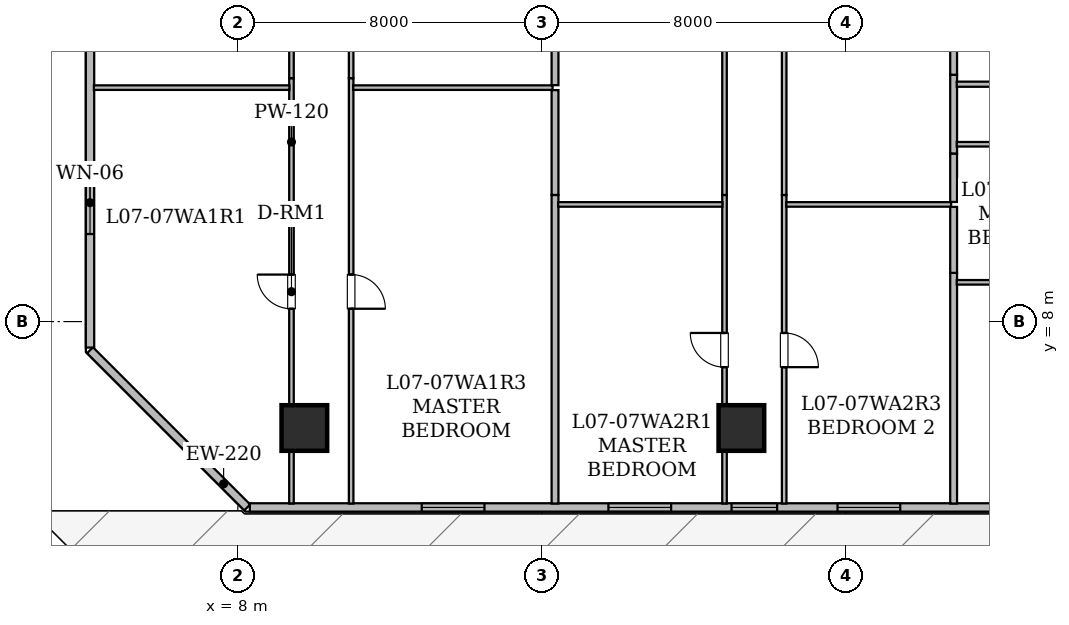
"""IFC4 building model, lengths in metres.
Left out: names, types, materials, properties, quantities, classifications, styles, units other than length and angle.
Written with IfcOpenShell. Run it as: python <this file> out.ifc"""

import sys

from ifc_helpers import new_model, si_unit, direction, frame, frame_2d, origin, origin_2d, place, context, subcontext, project, spatial, rectangle, hollow_rectangle, extrude, element, fill, save


model = new_model("IFC4")
c1 = context("Model", 3, precision=1e-05, world=origin(), true_north=direction((0.0, 1.0)))
c2 = subcontext(c1, "Body", "Model", "MODEL_VIEW")
j1 = project(units=[si_unit("LENGTHUNIT", "METRE"), si_unit("PLANEANGLEUNIT", "RADIAN")], contexts=[c1])
p1 = place(None, origin())
s1 = spatial("IfcSite", under=j1, at=p1, CompositionType="ELEMENT")
p2 = place(p1, origin())
s2 = spatial("IfcBuilding", under=s1, at=p2, CompositionType="ELEMENT")
p3 = place(p2, frame((0.0, 0.0, 33.3)))
s3 = spatial("IfcBuildingStorey", under=s2, at=p3, CompositionType="ELEMENT", Elevation=33.3)
for number, where, z_axis, x_axis in (
    (1, (9.75, 5.2, 0.025), (0.0, 0.0, 1.0), (1.0, 0.0, 0.0)),
    (2, (21.25, 5.2, 0.025), (0.0, 0.0, 1.0), (1.0, 0.0, 0.0)),
):
    element("IfcColumn", number, at=place(p3, frame(where, z_axis=z_axis, x_axis=x_axis)), inside=s3, PredefinedType="COLUMN", context=c2, shape_type="SweptSolid", body=[
        extrude(hollow_rectangle(XDim=1.2, YDim=1.2, WallThickness=0.06, at=origin_2d()), origin(), (0.0, 0.0, 1.0), 3.625),
    ])
p4 = place(p3, frame((8.246, 3.11, 0.0), z_axis=(0.0, 0.0, 1.0), x_axis=(-0.707106781187, 0.707106781187, 0.0)))
e3 = element("IfcWall", 3, at=p4, inside=s3, PredefinedType="STANDARD", context=c2, shape_type="SweptSolid", body=[
    extrude(rectangle(XDim=5.849, YDim=0.22, at=frame_2d((2.925, 0.0))), origin(), (0.0, 0.0, 1.0), 3.43),
])
p5 = place(p3, frame((4.11, 7.317, 0.0), z_axis=(0.0, 0.0, 1.0), x_axis=(0.0, 1.0, 0.0)))
e4 = element("IfcWall", 4, at=p5, inside=s3, PredefinedType="STANDARD", context=c2, shape_type="SweptSolid", body=[
    extrude(rectangle(XDim=17.446, YDim=0.22, at=frame_2d((8.723, 0.0))), origin(), (0.0, 0.0, 1.0), 3.43),
])
p6 = place(p5, frame((13.748, 0.0, 0.8)))
e5 = element("IfcOpeningElement", 5, at=p6, cuts=e4, PredefinedType="OPENING", context=c2, shape_type="SweptSolid", body=[
    extrude(rectangle(XDim=1.2, YDim=1.5, at=frame_2d((0.6, 0.75))), frame((0.0, 0.12, 0.0), z_axis=(0.0, -1.0, 0.0), x_axis=(1.0, 0.0, 0.0)), (0.0, 0.0, 1.0), 0.24),
])
p7 = place(p5, frame((2.987, 0.0, 0.85)))
e6 = element("IfcOpeningElement", 6, at=p7, cuts=e4, PredefinedType="OPENING", context=c2, shape_type="SweptSolid", body=[
    extrude(rectangle(XDim=1.65, YDim=1.55, at=frame_2d((0.825, 0.775))), frame((0.0, 0.12, 0.0), z_axis=(0.0, -1.0, 0.0), x_axis=(1.0, 0.0, 0.0)), (0.0, 0.0, 1.0), 0.24),
])
p8 = place(p5, frame((9.373, 0.0, 0.85)))
e7 = element("IfcOpeningElement", 7, at=p8, cuts=e4, PredefinedType="OPENING", context=c2, shape_type="SweptSolid", body=[
    extrude(rectangle(XDim=1.65, YDim=1.55, at=frame_2d((0.825, 0.775))), frame((0.0, 0.12, 0.0), z_axis=(0.0, -1.0, 0.0), x_axis=(1.0, 0.0, 0.0)), (0.0, 0.0, 1.0), 0.24),
])
p9 = place(p3, frame((45.683, 3.11, 0.0), z_axis=(0.0, 0.0, 1.0), x_axis=(-1.0, 0.0, 0.0)))
e8 = element("IfcWall", 8, at=p9, inside=s3, PredefinedType="STANDARD", context=c2, shape_type="SweptSolid", body=[
    extrude(rectangle(XDim=37.368, YDim=0.22, at=frame_2d((18.684, 0.0))), origin(), (0.0, 0.0, 1.0), 3.43),
])
p10 = place(p9, frame((5.728, 0.0, 0.0)))
e9 = element("IfcOpeningElement", 9, at=p10, cuts=e8, PredefinedType="OPENING", context=c2, shape_type="SweptSolid", body=[
    extrude(rectangle(XDim=1.0, YDim=2.15, at=frame_2d((0.5, 1.075))), frame((0.0, 0.12, 0.0), z_axis=(0.0, -1.0, 0.0), x_axis=(1.0, 0.0, 0.0)), (0.0, 0.0, 1.0), 0.24),
])
p11 = place(p9, frame((31.194, 0.0, 0.85)))
e10 = element("IfcOpeningElement", 10, at=p11, cuts=e8, PredefinedType="OPENING", context=c2, shape_type="SweptSolid", body=[
    extrude(rectangle(XDim=1.65, YDim=1.55, at=frame_2d((0.825, 0.775))), frame((0.0, 0.12, 0.0), z_axis=(0.0, -1.0, 0.0), x_axis=(1.0, 0.0, 0.0)), (0.0, 0.0, 1.0), 0.24),
])
p12 = place(p9, frame((23.492, 0.0, 0.8)))
e11 = element("IfcOpeningElement", 11, at=p12, cuts=e8, PredefinedType="OPENING", context=c2, shape_type="SweptSolid", body=[
    extrude(rectangle(XDim=1.2, YDim=1.5, at=frame_2d((0.6, 0.75))), frame((0.0, 0.12, 0.0), z_axis=(0.0, -1.0, 0.0), x_axis=(1.0, 0.0, 0.0)), (0.0, 0.0, 1.0), 0.24),
])
p13 = place(p9, frame((26.282, 0.0, 0.85)))
e12 = element("IfcOpeningElement", 12, at=p13, cuts=e8, PredefinedType="OPENING", context=c2, shape_type="SweptSolid", body=[
    extrude(rectangle(XDim=1.65, YDim=1.55, at=frame_2d((0.825, 0.775))), frame((0.0, 0.12, 0.0), z_axis=(0.0, -1.0, 0.0), x_axis=(1.0, 0.0, 0.0)), (0.0, 0.0, 1.0), 0.24),
])
p14 = place(p9, frame((20.253, 0.0, 0.85)))
e13 = element("IfcOpeningElement", 13, at=p14, cuts=e8, PredefinedType="OPENING", context=c2, shape_type="SweptSolid", body=[
    extrude(rectangle(XDim=1.65, YDim=1.55, at=frame_2d((0.825, 0.775))), frame((0.0, 0.12, 0.0), z_axis=(0.0, -1.0, 0.0), x_axis=(1.0, 0.0, 0.0)), (0.0, 0.0, 1.0), 0.24),
])
p15 = place(p9, frame((10.983, 0.0, 0.8)))
e14 = element("IfcOpeningElement", 14, at=p15, cuts=e8, PredefinedType="OPENING", context=c2, shape_type="SweptSolid", body=[
    extrude(rectangle(XDim=1.2, YDim=1.5, at=frame_2d((0.6, 0.75))), frame((0.0, 0.12, 0.0), z_axis=(0.0, -1.0, 0.0), x_axis=(1.0, 0.0, 0.0)), (0.0, 0.0, 1.0), 0.24),
])
p16 = place(p9, frame((14.783, 0.0, 0.85)))
e15 = element("IfcOpeningElement", 15, at=p16, cuts=e8, PredefinedType="OPENING", context=c2, shape_type="SweptSolid", body=[
    extrude(rectangle(XDim=1.65, YDim=1.55, at=frame_2d((0.825, 0.775))), frame((0.0, 0.12, 0.0), z_axis=(0.0, -1.0, 0.0), x_axis=(1.0, 0.0, 0.0)), (0.0, 0.0, 1.0), 0.24),
])
p17 = place(p9, frame((2.228, 0.0, 0.85)))
e16 = element("IfcOpeningElement", 16, at=p17, cuts=e8, PredefinedType="OPENING", context=c2, shape_type="SweptSolid", body=[
    extrude(rectangle(XDim=1.65, YDim=1.55, at=frame_2d((0.825, 0.775))), frame((0.0, 0.12, 0.0), z_axis=(0.0, -1.0, 0.0), x_axis=(1.0, 0.0, 0.0)), (0.0, 0.0, 1.0), 0.24),
])
p18 = place(p9, frame((0.187, 0.0, 0.8)))
e17 = element("IfcOpeningElement", 17, at=p18, cuts=e8, PredefinedType="OPENING", context=c2, shape_type="SweptSolid", body=[
    extrude(rectangle(XDim=1.2, YDim=1.5, at=frame_2d((0.6, 0.75))), frame((0.0, 0.12, 0.0), z_axis=(0.0, -1.0, 0.0), x_axis=(1.0, 0.0, 0.0)), (0.0, 0.0, 1.0), 0.24),
])
p19 = place(p3, frame((9.411, 3.212, 0.0), z_axis=(0.0, 0.0, 1.0), x_axis=(0.0, 1.0, 0.0)))
e18 = element("IfcWall", 18, at=p19, inside=s3, PredefinedType="PARTITIONING", context=c2, shape_type="SweptSolid", body=[
    extrude(rectangle(XDim=11.193, YDim=0.12, at=frame_2d((5.597, 0.0))), origin(), (0.0, 0.0, 1.0), 2.647),
])
p20 = place(p19, frame((5.125, 0.0, 0.0)))
e19 = element("IfcOpeningElement", 19, at=p20, cuts=e18, PredefinedType="OPENING", context=c2, shape_type="SweptSolid", body=[
    extrude(rectangle(XDim=0.9, YDim=2.1, at=frame_2d((0.45, 1.05))), frame((0.0, 0.07, 0.0), z_axis=(0.0, -1.0, 0.0), x_axis=(1.0, 0.0, 0.0)), (0.0, 0.0, 1.0), 0.14),
])
p21 = place(p3, frame((9.411, 14.405, 0.0), z_axis=(0.0, 0.0, 1.0), x_axis=(0.0, 1.0, 0.0)))
e20 = element("IfcWall", 20, at=p21, inside=s3, PredefinedType="PARTITIONING", context=c2, shape_type="SweptSolid", body=[
    extrude(rectangle(XDim=6.535, YDim=0.12, at=frame_2d((3.268, 0.0))), origin(), (0.0, 0.0, 1.0), 2.647),
])
p22 = place(p21, frame((2.817, 0.0, 0.0)))
e21 = element("IfcOpeningElement", 21, at=p22, cuts=e20, PredefinedType="OPENING", context=c2, shape_type="SweptSolid", body=[
    extrude(rectangle(XDim=0.9, YDim=2.1, at=frame_2d((0.45, 1.05))), frame((0.0, 0.07, 0.0), z_axis=(0.0, -1.0, 0.0), x_axis=(1.0, 0.0, 0.0)), (0.0, 0.0, 1.0), 0.14),
])
p23 = place(p3, frame((10.981, 14.405, 0.0), z_axis=(0.0, 0.0, 1.0), x_axis=(0.0, -1.0, 0.0)))
e22 = element("IfcWall", 22, at=p23, inside=s3, PredefinedType="PARTITIONING", context=c2, shape_type="SweptSolid", body=[
    extrude(rectangle(XDim=11.193, YDim=0.12, at=frame_2d((5.597, 0.0))), origin(), (0.0, 0.0, 1.0), 2.647),
])
p24 = place(p23, frame((5.167, 0.0, 0.0)))
e23 = element("IfcOpeningElement", 23, at=p24, cuts=e22, PredefinedType="OPENING", context=c2, shape_type="SweptSolid", body=[
    extrude(rectangle(XDim=0.9, YDim=2.1, at=frame_2d((0.45, 1.05))), frame((0.0, 0.07, 0.0), z_axis=(0.0, -1.0, 0.0), x_axis=(1.0, 0.0, 0.0)), (0.0, 0.0, 1.0), 0.14),
])
p25 = place(p3, frame((10.981, 20.94, 0.0), z_axis=(0.0, 0.0, 1.0), x_axis=(0.0, -1.0, 0.0)))
e24 = element("IfcWall", 24, at=p25, inside=s3, PredefinedType="PARTITIONING", context=c2, shape_type="SweptSolid", body=[
    extrude(rectangle(XDim=6.535, YDim=0.12, at=frame_2d((3.268, 0.0))), origin(), (0.0, 0.0, 1.0), 2.647),
])
p26 = place(p25, frame((2.817, 0.0, 0.0)))
e25 = element("IfcOpeningElement", 25, at=p26, cuts=e24, PredefinedType="OPENING", context=c2, shape_type="SweptSolid", body=[
    extrude(rectangle(XDim=0.9, YDim=2.1, at=frame_2d((0.45, 1.05))), frame((0.0, 0.07, 0.0), z_axis=(0.0, -1.0, 0.0), x_axis=(1.0, 0.0, 0.0)), (0.0, 0.0, 1.0), 0.14),
])
p27 = place(p3, frame((4.212, 14.156, 0.0), z_axis=(0.0, 0.0, 1.0), x_axis=(1.0, 0.0, 0.0)))
e26 = element("IfcWall", 26, at=p27, inside=s3, PredefinedType="PARTITIONING", context=c2, shape_type="SweptSolid", body=[
    extrude(rectangle(XDim=5.145, YDim=0.12, at=frame_2d((2.573, 0.0))), origin(), (0.0, 0.0, 1.0), 2.803),
])
p28 = place(p3, frame((11.035, 14.156, 0.0), z_axis=(0.0, 0.0, 1.0), x_axis=(1.0, 0.0, 0.0)))
e27 = element("IfcWall", 27, at=p28, inside=s3, PredefinedType="PARTITIONING", context=c2, shape_type="SweptSolid", body=[
    extrude(rectangle(XDim=5.246, YDim=0.12, at=frame_2d((2.623, 0.0))), origin(), (0.0, 0.0, 1.0), 2.647),
])
p29 = place(p3, frame((16.346, 11.332, 0.0), z_axis=(0.0, 0.0, 1.0), x_axis=(0.0, -1.0, 0.0)))
e28 = element("IfcWall", 28, at=p29, inside=s3, PredefinedType="STANDARD", context=c2, shape_type="SweptSolid", body=[
    extrude(rectangle(XDim=8.12, YDim=0.18, at=frame_2d((4.06, 0.0))), origin(), (0.0, 0.0, 1.0), 2.803),
])
p30 = place(p3, frame((16.346, 14.091, 0.0), z_axis=(0.0, 0.0, 1.0), x_axis=(0.0, -1.0, 0.0)))
e29 = element("IfcWall", 29, at=p30, inside=s3, PredefinedType="STANDARD", context=c2, shape_type="SweptSolid", body=[
    extrude(rectangle(XDim=2.759, YDim=0.18, at=frame_2d((1.379, 0.0))), origin(), (0.0, 0.0, 1.0), 3.43),
])
p31 = place(p3, frame((16.346, 20.81, 0.0), z_axis=(0.0, 0.0, 1.0), x_axis=(0.0, -1.0, 0.0)))
e30 = element("IfcWall", 30, at=p31, inside=s3, PredefinedType="STANDARD", context=c2, shape_type="SweptSolid", body=[
    extrude(rectangle(XDim=6.589, YDim=0.18, at=frame_2d((3.294, 0.0))), origin(), (0.0, 0.0, 1.0), 2.647),
])
p32 = place(p3, frame((20.806, 3.212, 0.0), z_axis=(0.0, 0.0, 1.0), x_axis=(0.0, 1.0, 0.0)))
e31 = element("IfcWall", 31, at=p32, inside=s3, PredefinedType="PARTITIONING", context=c2, shape_type="SweptSolid", body=[
    extrude(rectangle(XDim=8.12, YDim=0.12, at=frame_2d((4.06, 0.0))), origin(), (0.0, 0.0, 1.0), 2.647),
])
p33 = place(p32, frame((3.589, 0.0, 0.0)))
e32 = element("IfcOpeningElement", 32, at=p33, cuts=e31, PredefinedType="OPENING", context=c2, shape_type="SweptSolid", body=[
    extrude(rectangle(XDim=0.9, YDim=2.1, at=frame_2d((0.45, 1.05))), frame((0.0, 0.07, 0.0), z_axis=(0.0, -1.0, 0.0), x_axis=(1.0, 0.0, 0.0)), (0.0, 0.0, 1.0), 0.14),
])
p34 = place(p3, frame((20.806, 11.332, 0.0), z_axis=(0.0, 0.0, 1.0), x_axis=(0.0, 1.0, 0.0)))
e33 = element("IfcWall", 33, at=p34, inside=s3, PredefinedType="PARTITIONING", context=c2, shape_type="SweptSolid", body=[
    extrude(rectangle(XDim=9.608, YDim=0.12, at=frame_2d((4.804, 0.0))), origin(), (0.0, 0.0, 1.0), 2.647),
])
p35 = place(p34, frame((4.354, 0.0, 0.0)))
e34 = element("IfcOpeningElement", 34, at=p35, cuts=e33, PredefinedType="OPENING", context=c2, shape_type="SweptSolid", body=[
    extrude(rectangle(XDim=0.9, YDim=2.1, at=frame_2d((0.45, 1.05))), frame((0.0, 0.07, 0.0), z_axis=(0.0, -1.0, 0.0), x_axis=(1.0, 0.0, 0.0)), (0.0, 0.0, 1.0), 0.14),
])
p36 = place(p3, frame((22.376, 11.332, 0.0), z_axis=(0.0, 0.0, 1.0), x_axis=(0.0, -1.0, 0.0)))
e35 = element("IfcWall", 35, at=p36, inside=s3, PredefinedType="PARTITIONING", context=c2, shape_type="SweptSolid", body=[
    extrude(rectangle(XDim=8.12, YDim=0.12, at=frame_2d((4.06, 0.0))), origin(), (0.0, 0.0, 1.0), 2.803),
])
p37 = place(p36, frame((3.631, 0.0, 0.0)))
e36 = element("IfcOpeningElement", 36, at=p37, cuts=e35, PredefinedType="OPENING", context=c2, shape_type="SweptSolid", body=[
    extrude(rectangle(XDim=0.9, YDim=2.1, at=frame_2d((0.45, 1.05))), frame((0.0, 0.07, 0.0), z_axis=(0.0, -1.0, 0.0), x_axis=(1.0, 0.0, 0.0)), (0.0, 0.0, 1.0), 0.14),
])
p38 = place(p3, frame((22.376, 20.94, 0.0), z_axis=(0.0, 0.0, 1.0), x_axis=(0.0, -1.0, 0.0)))
e37 = element("IfcWall", 37, at=p38, inside=s3, PredefinedType="PARTITIONING", context=c2, shape_type="SweptSolid", body=[
    extrude(rectangle(XDim=9.608, YDim=0.12, at=frame_2d((4.804, 0.0))), origin(), (0.0, 0.0, 1.0), 2.647),
])
p39 = place(p38, frame((4.354, 0.0, 0.0)))
e38 = element("IfcOpeningElement", 38, at=p39, cuts=e37, PredefinedType="OPENING", context=c2, shape_type="SweptSolid", body=[
    extrude(rectangle(XDim=0.9, YDim=2.1, at=frame_2d((0.45, 1.05))), frame((0.0, 0.07, 0.0), z_axis=(0.0, -1.0, 0.0), x_axis=(1.0, 0.0, 0.0)), (0.0, 0.0, 1.0), 0.14),
])
p40 = place(p3, frame((16.428, 11.083, 0.0), z_axis=(0.0, 0.0, 1.0), x_axis=(1.0, 0.0, 0.0)))
e39 = element("IfcWall", 39, at=p40, inside=s3, PredefinedType="PARTITIONING", context=c2, shape_type="SweptSolid", body=[
    extrude(rectangle(XDim=4.324, YDim=0.12, at=frame_2d((2.162, 0.0))), origin(), (0.0, 0.0, 1.0), 2.647),
])
p41 = place(p3, frame((22.43, 11.083, 0.0), z_axis=(0.0, 0.0, 1.0), x_axis=(1.0, 0.0, 0.0)))
e40 = element("IfcWall", 40, at=p41, inside=s3, PredefinedType="PARTITIONING", context=c2, shape_type="SweptSolid", body=[
    extrude(rectangle(XDim=4.34, YDim=0.12, at=frame_2d((2.17, 0.0))), origin(), (0.0, 0.0, 1.0), 3.43),
])
p42 = place(p3, frame((26.835, 9.282, 0.0), z_axis=(0.0, 0.0, 1.0), x_axis=(0.0, -1.0, 0.0)))
e41 = element("IfcWall", 41, at=p42, inside=s3, PredefinedType="STANDARD", context=c2, shape_type="SweptSolid", body=[
    extrude(rectangle(XDim=6.07, YDim=0.18, at=frame_2d((3.035, 0.0))), origin(), (0.0, 0.0, 1.0), 2.803),
])
p43 = place(p3, frame((26.835, 11.018, 0.0), z_axis=(0.0, 0.0, 1.0), x_axis=(0.0, -1.0, 0.0)))
e42 = element("IfcWall", 42, at=p43, inside=s3, PredefinedType="STANDARD", context=c2, shape_type="SweptSolid", body=[
    extrude(rectangle(XDim=1.736, YDim=0.18, at=frame_2d((0.868, 0.0))), origin(), (0.0, 0.0, 1.0), 3.43),
])
p44 = place(p3, frame((26.835, 14.495, 0.0), z_axis=(0.0, 0.0, 1.0), x_axis=(0.0, -1.0, 0.0)))
e43 = element("IfcWall", 43, at=p44, inside=s3, PredefinedType="STANDARD", context=c2, shape_type="SweptSolid", body=[
    extrude(rectangle(XDim=2.078, YDim=0.18, at=frame_2d((1.039, 0.0))), origin(), (0.0, 0.0, 1.0), 3.43),
])
p45 = place(p3, frame((26.835, 16.9, 0.0), z_axis=(0.0, 0.0, 1.0), x_axis=(0.0, -1.0, 0.0)))
e44 = element("IfcWall", 44, at=p45, inside=s3, PredefinedType="STANDARD", context=c2, shape_type="SweptSolid", body=[
    extrude(rectangle(XDim=2.405, YDim=0.18, at=frame_2d((1.202, 0.0))), origin(), (0.0, 0.0, 1.0), 3.43),
])
p46 = place(p3, frame((26.835, 12.417, 0.0), z_axis=(0.0, 0.0, 1.0), x_axis=(0.0, -1.0, 0.0)))
e45 = element("IfcWall", 45, at=p46, inside=s3, PredefinedType="STANDARD", context=c2, shape_type="SweptSolid", body=[
    extrude(rectangle(XDim=1.269, YDim=0.18, at=frame_2d((0.635, 0.0))), origin(), (0.0, 0.0, 1.0), 3.43),
])
p47 = place(p3, frame((26.917, 14.246, 0.0), z_axis=(0.0, 0.0, 1.0), x_axis=(1.0, 0.0, 0.0)))
e46 = element("IfcWall", 46, at=p47, inside=s3, PredefinedType="PARTITIONING", context=c2, shape_type="SweptSolid", body=[
    extrude(rectangle(XDim=4.998, YDim=0.135, at=frame_2d((2.499, 0.0))), origin(), (0.0, 0.0, 1.0), 2.647),
])
p48 = place(p47, frame((2.074, 0.0, 0.0)))
e47 = element("IfcOpeningElement", 47, at=p48, cuts=e46, PredefinedType="OPENING", context=c2, shape_type="SweptSolid", body=[
    extrude(rectangle(XDim=0.85, YDim=2.1, at=frame_2d((0.425, 1.05))), frame((0.0, 0.077, 0.0), z_axis=(0.0, -1.0, 0.0), x_axis=(1.0, 0.0, 0.0)), (0.0, 0.0, 1.0), 0.155),
])
p49 = place(p3, frame((33.38, 12.666, 0.0), z_axis=(0.0, 0.0, 1.0), x_axis=(-1.0, 0.0, 0.0)))
e48 = element("IfcWall", 48, at=p49, inside=s3, PredefinedType="PARTITIONING", context=c2, shape_type="SweptSolid", body=[
    extrude(rectangle(XDim=6.463, YDim=0.12, at=frame_2d((3.231, 0.0))), origin(), (0.0, 0.0, 1.0), 2.647),
])
p50 = place(p49, frame((2.781, 0.0, 0.0)))
e49 = element("IfcOpeningElement", 49, at=p50, cuts=e48, PredefinedType="OPENING", context=c2, shape_type="SweptSolid", body=[
    extrude(rectangle(XDim=0.9, YDim=2.1, at=frame_2d((0.45, 1.05))), frame((0.0, 0.07, 0.0), z_axis=(0.0, -1.0, 0.0), x_axis=(1.0, 0.0, 0.0)), (0.0, 0.0, 1.0), 0.14),
])
p51 = place(p3, frame((26.917, 9.033, 0.0), z_axis=(0.0, 0.0, 1.0), x_axis=(1.0, 0.0, 0.0)))
e50 = element("IfcWall", 50, at=p51, inside=s3, PredefinedType="PARTITIONING", context=c2, shape_type="SweptSolid", body=[
    extrude(rectangle(XDim=6.344, YDim=0.12, at=frame_2d((3.172, 0.0))), origin(), (0.0, 0.0, 1.0), 2.647),
])
p52 = place(p7, origin())
e51 = element("IfcWindow", 51, at=p52, inside=s3, PartitioningType="SINGLE_PANEL", PredefinedType="WINDOW", context=c2, shape_type="SweptSolid", body=[
    extrude(rectangle(XDim=1.65, YDim=1.55, at=frame_2d((0.825, 0.775))), frame((0.0, 0.03, 0.0), z_axis=(0.0, -1.0, 0.0), x_axis=(1.0, 0.0, 0.0)), (0.0, 0.0, 1.0), 0.06),
])
fill(e6, e51)
p53 = place(p11, origin())
e52 = element("IfcWindow", 52, at=p53, inside=s3, PartitioningType="SINGLE_PANEL", PredefinedType="WINDOW", context=c2, shape_type="SweptSolid", body=[
    extrude(rectangle(XDim=1.65, YDim=1.55, at=frame_2d((0.825, 0.775))), frame((0.0, 0.03, 0.0), z_axis=(0.0, -1.0, 0.0), x_axis=(1.0, 0.0, 0.0)), (0.0, 0.0, 1.0), 0.06),
])
fill(e10, e52)
p54 = place(p12, origin())
e53 = element("IfcWindow", 53, at=p54, inside=s3, PartitioningType="SINGLE_PANEL", PredefinedType="WINDOW", context=c2, shape_type="SweptSolid", body=[
    extrude(rectangle(XDim=1.2, YDim=1.5, at=frame_2d((0.6, 0.75))), frame((0.0, 0.03, 0.0), z_axis=(0.0, -1.0, 0.0), x_axis=(1.0, 0.0, 0.0)), (0.0, 0.0, 1.0), 0.06),
])
fill(e11, e53)
p55 = place(p13, origin())
e54 = element("IfcWindow", 54, at=p55, inside=s3, PartitioningType="SINGLE_PANEL", PredefinedType="WINDOW", context=c2, shape_type="SweptSolid", body=[
    extrude(rectangle(XDim=1.65, YDim=1.55, at=frame_2d((0.825, 0.775))), frame((0.0, 0.03, 0.0), z_axis=(0.0, -1.0, 0.0), x_axis=(1.0, 0.0, 0.0)), (0.0, 0.0, 1.0), 0.06),
])
fill(e12, e54)
p56 = place(p14, origin())
e55 = element("IfcWindow", 55, at=p56, inside=s3, PartitioningType="SINGLE_PANEL", PredefinedType="WINDOW", context=c2, shape_type="SweptSolid", body=[
    extrude(rectangle(XDim=1.65, YDim=1.55, at=frame_2d((0.825, 0.775))), frame((0.0, 0.03, 0.0), z_axis=(0.0, -1.0, 0.0), x_axis=(1.0, 0.0, 0.0)), (0.0, 0.0, 1.0), 0.06),
])
fill(e13, e55)
p57 = place(p20, origin())
e56 = element("IfcDoor", 56, at=p57, inside=s3, OperationType="SINGLE_SWING_RIGHT", PredefinedType="DOOR", context=c2, shape_type="SweptSolid", body=[
    extrude(rectangle(XDim=0.9, YDim=2.1, at=frame_2d((0.45, 1.05))), frame((0.0, 0.025, 0.0), z_axis=(0.0, -1.0, 0.0), x_axis=(1.0, 0.0, 0.0)), (0.0, 0.0, 1.0), 0.05),
])
fill(e19, e56)
p58 = place(p24, origin())
e57 = element("IfcDoor", 57, at=p58, inside=s3, OperationType="SINGLE_SWING_RIGHT", PredefinedType="DOOR", context=c2, shape_type="SweptSolid", body=[
    extrude(rectangle(XDim=0.9, YDim=2.1, at=frame_2d((0.45, 1.05))), frame((0.0, 0.025, 0.0), z_axis=(0.0, -1.0, 0.0), x_axis=(1.0, 0.0, 0.0)), (0.0, 0.0, 1.0), 0.05),
])
fill(e23, e57)
p59 = place(p33, origin())
e58 = element("IfcDoor", 58, at=p59, inside=s3, OperationType="SINGLE_SWING_RIGHT", PredefinedType="DOOR", context=c2, shape_type="SweptSolid", body=[
    extrude(rectangle(XDim=0.9, YDim=2.1, at=frame_2d((0.45, 1.05))), frame((0.0, 0.025, 0.0), z_axis=(0.0, -1.0, 0.0), x_axis=(1.0, 0.0, 0.0)), (0.0, 0.0, 1.0), 0.05),
])
fill(e32, e58)
p60 = place(p37, origin())
e59 = element("IfcDoor", 59, at=p60, inside=s3, OperationType="SINGLE_SWING_RIGHT", PredefinedType="DOOR", context=c2, shape_type="SweptSolid", body=[
    extrude(rectangle(XDim=0.9, YDim=2.1, at=frame_2d((0.45, 1.05))), frame((0.0, 0.025, 0.0), z_axis=(0.0, -1.0, 0.0), x_axis=(1.0, 0.0, 0.0)), (0.0, 0.0, 1.0), 0.05),
])
fill(e36, e59)
save(model, sys.argv[1])
